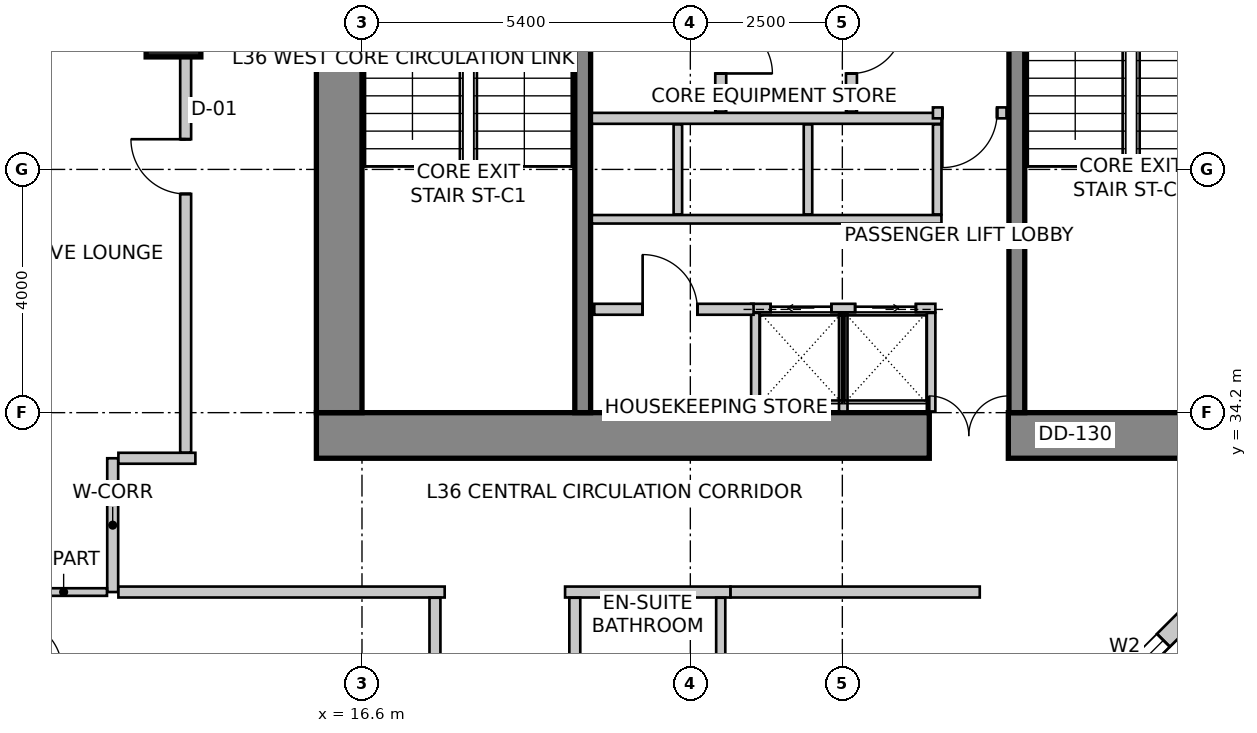
"""IFC4 building model, lengths in metres.
Left out: names, types, materials, properties, quantities, classifications, styles, units other than length and angle.
Written with IfcOpenShell. Run it as: python <this file> out.ifc"""

import sys

from ifc_helpers import new_model, si_unit, direction, frame, frame_2d, origin, origin_2d, place, context, subcontext, project, spatial, rectangle, extrude, source, transform, mapped, element, fill, save


model = new_model("IFC4")
c1 = context("Model", 3, precision=1e-05, world=origin(), true_north=direction((0.0, 1.0)))
c2 = subcontext(c1, "Body", "Model", "MODEL_VIEW")
j1 = project(units=[si_unit("LENGTHUNIT", "METRE"), si_unit("PLANEANGLEUNIT", "RADIAN")], contexts=[c1])
p1 = place(None, origin())
s1 = spatial("IfcSite", under=j1, at=p1, CompositionType="ELEMENT")
p2 = place(p1, origin())
s2 = spatial("IfcBuilding", under=s1, at=p2, CompositionType="ELEMENT")
p3 = place(p2, frame((0.0, 0.0, 146.6)))
s3 = spatial("IfcBuildingStorey", under=s2, at=p3, CompositionType="ELEMENT", Elevation=146.6)
p4 = place(p3, frame((15.85, 33.825, 0.0), z_axis=(0.0, 0.0, 1.0), x_axis=(1.0, 0.0, 0.0)))
e1 = element("IfcWall", 1, at=p4, inside=s3, PredefinedType="SHEAR", context=c2, shape_type="SweptSolid", body=[
    extrude(rectangle(XDim=15.9, YDim=0.75, at=frame_2d((7.95, 0.0))), origin(), (0.0, 0.0, 1.0), 3.6),
])
m1 = source(origin(), c2, "Body", "SweptSolid", [
    extrude(rectangle(XDim=1.3, YDim=2.15, at=frame_2d((0.65, 1.075))), frame((0.0, 0.385, 0.0), z_axis=(0.0, -1.0, 0.0), x_axis=(1.0, 0.0, 0.0)), (0.0, 0.0, 1.0), 0.77),
])
p5 = place(p4, frame((10.08, 0.0, 0.0)))
e2 = element("IfcOpeningElement", 2, at=p5, cuts=e1, PredefinedType="OPENING", context=c2, shape_type="MappedRepresentation", body=[
    mapped(m1, transform((0.0, 0.0, 0.0), scale=1.0)),
])
p6 = place(p3, frame((16.225, 34.2, 0.0), z_axis=(0.0, 0.0, 1.0), x_axis=(0.0, 1.0, 0.0)))
e3 = element("IfcWall", 3, at=p6, inside=s3, PredefinedType="SHEAR", context=c2, shape_type="SweptSolid", body=[
    extrude(rectangle(XDim=11.4, YDim=0.75, at=frame_2d((5.7, 0.0))), origin(), (0.0, 0.0, 1.0), 3.6),
])
m2 = source(origin(), c2, "Body", "SweptSolid", [
    extrude(rectangle(XDim=1.1, YDim=2.15, at=frame_2d((0.55, 1.075))), frame((0.0, 0.385, 0.0), z_axis=(0.0, -1.0, 0.0), x_axis=(1.0, 0.0, 0.0)), (0.0, 0.0, 1.0), 0.77),
])
p7 = place(p6, frame((7.15, 0.0, 0.0)))
e4 = element("IfcOpeningElement", 4, at=p7, cuts=e3, PredefinedType="OPENING", context=c2, shape_type="MappedRepresentation", body=[
    mapped(m2, transform((0.0, 0.0, 0.0), scale=1.0)),
])
p8 = place(p3, frame((20.23, 34.2, 0.0), z_axis=(0.0, 0.0, 1.0), x_axis=(0.0, 1.0, 0.0)))
e5 = element("IfcWall", 5, at=p8, inside=s3, PredefinedType="SHEAR", context=c2, shape_type="SweptSolid", body=[
    extrude(rectangle(XDim=9.06, YDim=0.26, at=frame_2d((4.53, 0.0))), origin(), (0.0, 0.0, 1.0), 3.6),
])
m3 = source(origin(), c2, "Body", "SweptSolid", [
    extrude(rectangle(XDim=1.1, YDim=2.15, at=frame_2d((0.55, 1.075))), frame((0.0, 0.14, 0.0), z_axis=(0.0, -1.0, 0.0), x_axis=(1.0, 0.0, 0.0)), (0.0, 0.0, 1.0), 0.28),
])
p9 = place(p8, frame((7.45, 0.0, 0.0)))
e6 = element("IfcOpeningElement", 6, at=p9, cuts=e5, PredefinedType="OPENING", context=c2, shape_type="MappedRepresentation", body=[
    mapped(m3, transform((0.0, 0.0, 0.0), scale=1.0)),
])
p10 = place(p3, frame((27.37, 34.2, 0.0), z_axis=(0.0, 0.0, 1.0), x_axis=(0.0, 1.0, 0.0)))
e7 = element("IfcWall", 7, at=p10, inside=s3, PredefinedType="SHEAR", context=c2, shape_type="SweptSolid", body=[
    extrude(rectangle(XDim=9.06, YDim=0.26, at=frame_2d((4.53, 0.0))), origin(), (0.0, 0.0, 1.0), 3.6),
])
p11 = place(p10, frame((7.45, 0.0, 0.0)))
e8 = element("IfcOpeningElement", 8, at=p11, cuts=e7, PredefinedType="OPENING", context=c2, shape_type="MappedRepresentation", body=[
    mapped(m3, transform((0.0, 0.0, 0.0), scale=1.0)),
])
m4 = source(origin(), c2, "Body", "SweptSolid", [
    extrude(rectangle(XDim=0.9, YDim=0.9, at=origin_2d()), origin(), (0.0, 0.0, 1.0), 3.6),
])
p12 = place(p3, frame((13.5, 40.5, 0.0), z_axis=(0.0, 0.0, 1.0), x_axis=(1.0, 0.0, 0.0)))
e9 = element("IfcColumn", 9, at=p12, inside=s3, PredefinedType="COLUMN", context=c2, shape_type="MappedRepresentation", body=[
    mapped(m4, transform((0.0, 0.0, 0.0), scale=1.0)),
])
p13 = place(p3, frame((28.116, 28.792, 0.0), z_axis=(0.0, 0.0, 1.0), x_axis=(0.707064797706, 0.707148762175, 0.0)))
e10 = element("IfcWall", 10, at=p13, inside=s3, PredefinedType="SOLIDWALL", context=c2, shape_type="SweptSolid", body=[
    extrude(rectangle(XDim=2.908, YDim=0.3, at=frame_2d((1.454, 0.0))), origin(), (0.0, 0.0, 1.0), 3.35),
])
m5 = source(origin(), c2, "Body", "SweptSolid", [
    extrude(rectangle(XDim=1.8, YDim=2.1, at=frame_2d((0.9, 1.05))), frame((0.0, 0.16, 0.0), z_axis=(0.0, -1.0, 0.0), x_axis=(1.0, 0.0, 0.0)), (0.0, 0.0, 1.0), 0.32),
])
p14 = place(p13, frame((0.554, 0.0, 0.85)))
e11 = element("IfcOpeningElement", 11, at=p14, cuts=e10, PredefinedType="OPENING", context=c2, shape_type="MappedRepresentation", body=[
    mapped(m5, transform((0.0, 0.0, 0.0), scale=1.0)),
])
p15 = place(p3, frame((13.269, 47.134, 0.0), z_axis=(0.0, 0.0, 1.0), x_axis=(-0.319929773322, -0.947441259468, 0.0)))
e12 = element("IfcWall", 12, at=p15, inside=s3, PredefinedType="SOLIDWALL", context=c2, shape_type="SweptSolid", body=[
    extrude(rectangle(XDim=16.134, YDim=0.3, at=frame_2d((8.067, 0.0))), origin(), (0.0, 0.0, 1.0), 3.35),
])
m6 = source(origin(), c2, "Body", "SweptSolid", [
    extrude(rectangle(XDim=2.4, YDim=2.2, at=frame_2d((1.2, 1.1))), frame((0.0, 0.16, 0.0), z_axis=(0.0, -1.0, 0.0), x_axis=(1.0, 0.0, 0.0)), (0.0, 0.0, 1.0), 0.32),
])
p16 = place(p15, frame((2.276, 0.0, 0.85)))
e13 = element("IfcOpeningElement", 13, at=p16, cuts=e12, PredefinedType="OPENING", context=c2, shape_type="MappedRepresentation", body=[
    mapped(m6, transform((0.0, 0.0, 0.0), scale=1.0)),
])
m7 = source(origin(), c2, "Body", "SweptSolid", [
    extrude(rectangle(XDim=2.1, YDim=2.0, at=frame_2d((1.05, 1.0))), frame((0.0, 0.16, 0.0), z_axis=(0.0, -1.0, 0.0), x_axis=(1.0, 0.0, 0.0)), (0.0, 0.0, 1.0), 0.32),
])
p17 = place(p15, frame((7.361, 0.0, 0.85)))
e14 = element("IfcOpeningElement", 14, at=p17, cuts=e12, PredefinedType="OPENING", context=c2, shape_type="MappedRepresentation", body=[
    mapped(m7, transform((0.0, 0.0, 0.0), scale=1.0)),
])
p18 = place(p15, frame((12.146, 0.0, 0.85)))
e15 = element("IfcOpeningElement", 15, at=p18, cuts=e12, PredefinedType="OPENING", context=c2, shape_type="MappedRepresentation", body=[
    mapped(m6, transform((0.0, 0.0, 0.0), scale=1.0)),
])
p19 = place(p3, frame((8.187, 31.834, 0.0), z_axis=(0.0, 0.0, 1.0), x_axis=(0.198869838988, -0.980025911464, 0.0)))
e16 = element("IfcWall", 16, at=p19, inside=s3, PredefinedType="SOLIDWALL", context=c2, shape_type="SweptSolid", body=[
    extrude(rectangle(XDim=16.363, YDim=0.3, at=frame_2d((8.182, 0.0))), origin(), (0.0, 0.0, 1.0), 3.35),
])
m8 = source(origin(), c2, "Body", "SweptSolid", [
    extrude(rectangle(XDim=1.2, YDim=1.6, at=frame_2d((0.6, 0.8))), frame((0.0, 0.16, 0.0), z_axis=(0.0, -1.0, 0.0), x_axis=(1.0, 0.0, 0.0)), (0.0, 0.0, 1.0), 0.32),
])
p20 = place(p19, frame((1.131, 0.0, 0.85)))
e17 = element("IfcOpeningElement", 17, at=p20, cuts=e16, PredefinedType="OPENING", context=c2, shape_type="MappedRepresentation", body=[
    mapped(m8, transform((0.0, 0.0, 0.0), scale=1.0)),
])
p21 = place(p19, frame((4.345, 0.0, 0.85)))
e18 = element("IfcOpeningElement", 18, at=p21, cuts=e16, PredefinedType="OPENING", context=c2, shape_type="MappedRepresentation", body=[
    mapped(m7, transform((0.0, 0.0, 0.0), scale=1.0)),
])
p22 = place(p19, frame((8.857, 0.0, 0.85)))
e19 = element("IfcOpeningElement", 19, at=p22, cuts=e16, PredefinedType="OPENING", context=c2, shape_type="MappedRepresentation", body=[
    mapped(m6, transform((0.0, 0.0, 0.0), scale=1.0)),
])
p23 = place(p19, frame((13.386, 0.0, 0.85)))
e20 = element("IfcOpeningElement", 20, at=p23, cuts=e16, PredefinedType="OPENING", context=c2, shape_type="MappedRepresentation", body=[
    mapped(m7, transform((0.0, 0.0, 0.0), scale=1.0)),
])
p24 = place(p3, frame((23.0, 35.92, 0.0), z_axis=(0.0, 0.0, 1.0), x_axis=(1.0, 0.0, 0.0)))
e21 = element("IfcWall", 21, at=p24, inside=s3, PredefinedType="SOLIDWALL", context=c2, shape_type="SweptSolid", body=[
    extrude(rectangle(XDim=3.03, YDim=0.14, at=frame_2d((1.515, 0.0))), origin(), (0.0, 0.0, 1.0), 3.35),
])
m9 = source(origin(), c2, "Body", "SweptSolid", [
    extrude(rectangle(XDim=1.0, YDim=2.15, at=frame_2d((0.5, 1.075))), frame((0.0, 0.08, 0.0), z_axis=(0.0, -1.0, 0.0), x_axis=(1.0, 0.0, 0.0)), (0.0, 0.0, 1.0), 0.16),
])
p25 = place(p24, frame((0.32, 0.0, 0.0)))
e22 = element("IfcOpeningElement", 22, at=p25, cuts=e21, PredefinedType="OPENING", context=c2, shape_type="MappedRepresentation", body=[
    mapped(m9, transform((0.0, 0.0, 0.0), scale=1.0)),
])
p26 = place(p24, frame((1.71, 0.0, 0.0)))
e23 = element("IfcOpeningElement", 23, at=p26, cuts=e21, PredefinedType="OPENING", context=c2, shape_type="MappedRepresentation", body=[
    mapped(m9, transform((0.0, 0.0, 0.0), scale=1.0)),
])
for number, where, z_axis, x_axis in (
    (24, (25.96, 34.22, 0.0), (0.0, 0.0, 1.0), (0.0, 1.0, 0.0)),
    (25, (23.07, 34.22, 0.0), (0.0, 0.0, 1.0), (0.0, 1.0, 0.0)),
    (26, (24.515, 34.22, 0.0), (0.0, 0.0, 1.0), (0.0, 1.0, 0.0)),
):
    element("IfcWall", number, at=place(p3, frame(where, z_axis=z_axis, x_axis=x_axis)), inside=s3, PredefinedType="SOLIDWALL", context=c2, shape_type="SweptSolid", body=[
        extrude(rectangle(XDim=1.62, YDim=0.14, at=frame_2d((0.81, 0.0))), origin(), (0.0, 0.0, 1.0), 2.642),
    ])
p27 = place(p3, frame((20.38, 37.38, 0.0), z_axis=(0.0, 0.0, 1.0), x_axis=(1.0, 0.0, 0.0)))
e27 = element("IfcWall", 27, at=p27, inside=s3, PredefinedType="SOLIDWALL", context=c2, shape_type="SweptSolid", body=[
    extrude(rectangle(XDim=5.75, YDim=0.14, at=frame_2d((2.875, 0.0))), origin(), (0.0, 0.0, 1.0), 3.35),
])
p28 = place(p3, frame((20.38, 39.04, 0.0), z_axis=(0.0, 0.0, 1.0), x_axis=(1.0, 0.0, 0.0)))
e28 = element("IfcWall", 28, at=p28, inside=s3, PredefinedType="SOLIDWALL", context=c2, shape_type="SweptSolid", body=[
    extrude(rectangle(XDim=5.75, YDim=0.18, at=frame_2d((2.875, 0.0))), origin(), (0.0, 0.0, 1.0), 3.35),
])
for number, where, z_axis, x_axis in (
    (29, (26.06, 37.46, 0.0), (0.0, 0.0, 1.0), (0.0, 1.0, 0.0)),
    (30, (21.795, 37.46, 0.0), (0.0, 0.0, 1.0), (0.0, 1.0, 0.0)),
    (31, (23.935, 37.46, 0.0), (0.0, 0.0, 1.0), (0.0, 1.0, 0.0)),
):
    element("IfcWall", number, at=place(p3, frame(where, z_axis=z_axis, x_axis=x_axis)), inside=s3, PredefinedType="SOLIDWALL", context=c2, shape_type="SweptSolid", body=[
        extrude(rectangle(XDim=1.48, YDim=0.14, at=frame_2d((0.74, 0.0))), origin(), (0.0, 0.0, 1.0), 3.35),
    ])
p29 = place(p3, frame((22.5, 41.256, 0.0), z_axis=(0.0, 0.0, 1.0), x_axis=(0.0, -1.0, 0.0)))
e32 = element("IfcWall", 32, at=p29, inside=s3, PredefinedType="PARTITIONING", context=c2, shape_type="SweptSolid", body=[
    extrude(rectangle(XDim=2.106, YDim=0.18, at=frame_2d((1.053, 0.0))), origin(), (0.0, 0.0, 1.0), 3.35),
])
m10 = source(origin(), c2, "Body", "SweptSolid", [
    extrude(rectangle(XDim=0.85, YDim=2.15, at=frame_2d((0.425, 1.075))), frame((0.0, 0.1, 0.0), z_axis=(0.0, -1.0, 0.0), x_axis=(1.0, 0.0, 0.0)), (0.0, 0.0, 1.0), 0.2),
])
p30 = place(p29, frame((0.628, 0.0, 0.0)))
e33 = element("IfcOpeningElement", 33, at=p30, cuts=e32, PredefinedType="OPENING", context=c2, shape_type="MappedRepresentation", body=[
    mapped(m10, transform((0.0, 0.0, 0.0), scale=1.0)),
])
p31 = place(p3, frame((24.65, 41.256, 0.0), z_axis=(0.0, 0.0, 1.0), x_axis=(0.0, -1.0, 0.0)))
e34 = element("IfcWall", 34, at=p31, inside=s3, PredefinedType="PARTITIONING", context=c2, shape_type="SweptSolid", body=[
    extrude(rectangle(XDim=2.106, YDim=0.18, at=frame_2d((1.053, 0.0))), origin(), (0.0, 0.0, 1.0), 3.35),
])
p32 = place(p31, frame((0.628, 0.0, 0.0)))
e35 = element("IfcOpeningElement", 35, at=p32, cuts=e34, PredefinedType="OPENING", context=c2, shape_type="MappedRepresentation", body=[
    mapped(m10, transform((0.0, 0.0, 0.0), scale=1.0)),
])
p33 = place(p3, frame((27.2, 39.13, 0.0), z_axis=(0.0, 0.0, 1.0), x_axis=(-1.0, 0.0, 0.0)))
e36 = element("IfcWall", 36, at=p33, inside=s3, PredefinedType="PARTITIONING", context=c2, shape_type="SweptSolid", body=[
    extrude(rectangle(XDim=1.21, YDim=0.18, at=frame_2d((0.605, 0.0))), origin(), (0.0, 0.0, 1.0), 3.35),
])
m11 = source(origin(), c2, "Body", "SweptSolid", [
    extrude(rectangle(XDim=0.9, YDim=2.15, at=frame_2d((0.45, 1.075))), frame((0.0, 0.1, 0.0), z_axis=(0.0, -1.0, 0.0), x_axis=(1.0, 0.0, 0.0)), (0.0, 0.0, 1.0), 0.2),
])
p34 = place(p33, frame((0.155, 0.0, 0.0)))
e37 = element("IfcOpeningElement", 37, at=p34, cuts=e36, PredefinedType="OPENING", context=c2, shape_type="MappedRepresentation", body=[
    mapped(m11, transform((0.0, 0.0, 0.0), scale=1.0)),
])
p35 = place(p3, frame((20.42, 35.9, 0.0), z_axis=(0.0, 0.0, 1.0), x_axis=(1.0, 0.0, 0.0)))
e38 = element("IfcWall", 38, at=p35, inside=s3, PredefinedType="PARTITIONING", context=c2, shape_type="SweptSolid", body=[
    extrude(rectangle(XDim=2.62, YDim=0.18, at=frame_2d((1.31, 0.0))), origin(), (0.0, 0.0, 1.0), 3.35),
])
p36 = place(p35, frame((0.796, 0.0, 0.0)))
e39 = element("IfcOpeningElement", 39, at=p36, cuts=e38, PredefinedType="OPENING", context=c2, shape_type="MappedRepresentation", body=[
    mapped(m11, transform((0.0, 0.0, 0.0), scale=1.0)),
])
p37 = place(p3, frame((12.5, 31.25, 0.0), z_axis=(0.0, 0.0, 1.0), x_axis=(0.0, 1.0, 0.0)))
e40 = element("IfcWall", 40, at=p37, inside=s3, PredefinedType="PARTITIONING", context=c2, shape_type="SweptSolid", body=[
    extrude(rectangle(XDim=2.2, YDim=0.18, at=frame_2d((1.1, 0.0))), origin(), (0.0, 0.0, 1.0), 2.935),
])
p38 = place(p3, frame((12.594, 33.45, 0.0), z_axis=(0.0, 0.0, 1.0), x_axis=(1.0, 0.0, 0.0)))
e41 = element("IfcWall", 41, at=p38, inside=s3, PredefinedType="PARTITIONING", context=c2, shape_type="SweptSolid", body=[
    extrude(rectangle(XDim=1.266, YDim=0.18, at=frame_2d((0.633, 0.0))), origin(), (0.0, 0.0, 1.0), 3.35),
])
p39 = place(p3, frame((17.96, 31.25, 0.0), z_axis=(0.0, 0.0, 1.0), x_axis=(-1.0, 0.0, 0.0)))
e42 = element("IfcWall", 42, at=p39, inside=s3, PredefinedType="PARTITIONING", context=c2, shape_type="SweptSolid", body=[
    extrude(rectangle(XDim=5.366, YDim=0.18, at=frame_2d((2.683, 0.0))), origin(), (0.0, 0.0, 1.0), 2.935),
])
p40 = place(p3, frame((22.66, 31.25, 0.0), z_axis=(0.0, 0.0, 1.0), x_axis=(-1.0, 0.0, 0.0)))
e43 = element("IfcWall", 43, at=p40, inside=s3, PredefinedType="PARTITIONING", context=c2, shape_type="SweptSolid", body=[
    extrude(rectangle(XDim=2.72, YDim=0.18, at=frame_2d((1.36, 0.0))), origin(), (0.0, 0.0, 1.0), 2.935),
])
p41 = place(p3, frame((26.76, 31.25, 0.0), z_axis=(0.0, 0.0, 1.0), x_axis=(-1.0, 0.0, 0.0)))
e44 = element("IfcWall", 44, at=p41, inside=s3, PredefinedType="PARTITIONING", context=c2, shape_type="SweptSolid", body=[
    extrude(rectangle(XDim=4.098, YDim=0.18, at=frame_2d((2.049, 0.0))), origin(), (0.0, 0.0, 1.0), 3.35),
])
p42 = place(p3, frame((13.7, 33.544, 0.0), z_axis=(0.0, 0.0, 1.0), x_axis=(0.0, 1.0, 0.0)))
e45 = element("IfcWall", 45, at=p42, inside=s3, PredefinedType="PARTITIONING", context=c2, shape_type="SweptSolid", body=[
    extrude(rectangle(XDim=13.86, YDim=0.18, at=frame_2d((6.93, 0.0))), origin(), (0.0, 0.0, 1.0), 2.492),
])
p43 = place(p42, frame((4.253, 0.0, 0.0)))
e46 = element("IfcOpeningElement", 46, at=p43, cuts=e45, PredefinedType="OPENING", context=c2, shape_type="MappedRepresentation", body=[
    mapped(m11, transform((0.0, 0.0, 0.0), scale=1.0)),
])
p44 = place(p3, frame((12.406, 31.25, 0.0), z_axis=(0.0, 0.0, 1.0), x_axis=(-1.0, 0.0, 0.0)))
e47 = element("IfcWall", 47, at=p44, inside=s3, PredefinedType="PARTITIONING", context=c2, shape_type="SweptSolid", body=[
    extrude(rectangle(XDim=1.426, YDim=0.125, at=frame_2d((0.713, 0.0))), origin(), (0.0, 0.0, 1.0), 2.492),
])
p45 = place(p3, frame((17.8, 19.5, 0.0), z_axis=(0.0, 0.0, 1.0), x_axis=(0.0, 1.0, 0.0)))
e48 = element("IfcWall", 48, at=p45, inside=s3, PredefinedType="PARTITIONING", context=c2, shape_type="SweptSolid", body=[
    extrude(rectangle(XDim=11.656, YDim=0.18, at=frame_2d((5.828, 0.0))), origin(), (0.0, 0.0, 1.0), 2.788),
])
p46 = place(p45, frame((5.378, 0.0, 0.0)))
e49 = element("IfcOpeningElement", 49, at=p46, cuts=e48, PredefinedType="OPENING", context=c2, shape_type="MappedRepresentation", body=[
    mapped(m11, transform((0.0, 0.0, 0.0), scale=1.0)),
])
p47 = place(p3, frame((20.1, 31.156, 0.0), z_axis=(0.0, 0.0, 1.0), x_axis=(0.0, -1.0, 0.0)))
e50 = element("IfcWall", 50, at=p47, inside=s3, PredefinedType="PARTITIONING", context=c2, shape_type="SweptSolid", body=[
    extrude(rectangle(XDim=2.266, YDim=0.18, at=frame_2d((1.133, 0.0))), origin(), (0.0, 0.0, 1.0), 2.935),
])
p48 = place(p3, frame((22.5, 31.156, 0.0), z_axis=(0.0, 0.0, 1.0), x_axis=(0.0, -1.0, 0.0)))
e51 = element("IfcWall", 51, at=p48, inside=s3, PredefinedType="PARTITIONING", context=c2, shape_type="SweptSolid", body=[
    extrude(rectangle(XDim=2.027, YDim=0.15, at=frame_2d((1.014, 0.0))), origin(), (0.0, 0.0, 1.0), 2.935),
])
m12 = source(origin(), c2, "Body", "SweptSolid", [
    extrude(rectangle(XDim=1.8, YDim=2.1, at=frame_2d((0.9, 1.05))), frame((0.0, -0.015, 0.0), z_axis=(0.0, -1.0, 0.0), x_axis=(1.0, 0.0, 0.0)), (0.0, 0.0, 1.0), 0.06),
])
p49 = place(p14, origin())
e52 = element("IfcWindow", 52, at=p49, inside=s3, PartitioningType="SINGLE_PANEL", PredefinedType="WINDOW", context=c2, shape_type="MappedRepresentation", body=[
    mapped(m12, transform((0.0, 0.0, 0.0), scale=1.0)),
])
fill(e11, e52)
m13 = source(origin(), c2, "Body", "SweptSolid", [
    extrude(rectangle(XDim=1.0, YDim=2.15, at=frame_2d((0.5, 1.075))), frame((0.0, 0.025, 0.0), z_axis=(0.0, -1.0, 0.0), x_axis=(1.0, 0.0, 0.0)), (0.0, 0.0, 1.0), 0.05),
])
p50 = place(p25, origin())
e53 = element("IfcDoor", 53, at=p50, inside=s3, OperationType="SLIDING_TO_LEFT", PredefinedType="DOOR", context=c2, shape_type="MappedRepresentation", body=[
    mapped(m13, transform((0.0, 0.0, 0.0), scale=1.0)),
])
fill(e22, e53)
p51 = place(p26, origin())
e54 = element("IfcDoor", 54, at=p51, inside=s3, OperationType="SLIDING_TO_RIGHT", PredefinedType="DOOR", context=c2, shape_type="MappedRepresentation", body=[
    mapped(m13, transform((0.0, 0.0, 0.0), scale=1.0)),
])
fill(e23, e54)
m14 = source(origin(), c2, "Body", "SweptSolid", [
    extrude(rectangle(XDim=1.3, YDim=2.15, at=frame_2d((0.65, 1.075))), frame((0.0, 0.025, 0.0), z_axis=(0.0, -1.0, 0.0), x_axis=(1.0, 0.0, 0.0)), (0.0, 0.0, 1.0), 0.05),
])
p52 = place(p5, origin())
e55 = element("IfcDoor", 55, at=p52, inside=s3, OperationType="DOUBLE_DOOR_SINGLE_SWING", PredefinedType="DOOR", context=c2, shape_type="MappedRepresentation", body=[
    mapped(m14, transform((0.0, 0.0, 0.0), scale=1.0)),
])
fill(e2, e55)
m15 = source(origin(), c2, "Body", "SweptSolid", [
    extrude(rectangle(XDim=0.85, YDim=2.15, at=frame_2d((0.425, 1.075))), frame((0.0, 0.025, 0.0), z_axis=(0.0, -1.0, 0.0), x_axis=(1.0, 0.0, 0.0)), (0.0, 0.0, 1.0), 0.05),
])
p53 = place(p30, origin())
e56 = element("IfcDoor", 56, at=p53, inside=s3, OperationType="SINGLE_SWING_RIGHT", PredefinedType="DOOR", context=c2, shape_type="MappedRepresentation", body=[
    mapped(m15, transform((0.0, 0.0, 0.0), scale=1.0)),
])
fill(e33, e56)
p54 = place(p32, origin())
e57 = element("IfcDoor", 57, at=p54, inside=s3, OperationType="SINGLE_SWING_LEFT", PredefinedType="DOOR", context=c2, shape_type="MappedRepresentation", body=[
    mapped(m15, transform((0.0, 0.0, 0.0), scale=1.0)),
])
fill(e35, e57)
m16 = source(origin(), c2, "Body", "SweptSolid", [
    extrude(rectangle(XDim=0.9, YDim=2.15, at=frame_2d((0.45, 1.075))), frame((0.0, 0.025, 0.0), z_axis=(0.0, -1.0, 0.0), x_axis=(1.0, 0.0, 0.0)), (0.0, 0.0, 1.0), 0.05),
])
p55 = place(p34, origin())
e58 = element("IfcDoor", 58, at=p55, inside=s3, OperationType="SINGLE_SWING_RIGHT", PredefinedType="DOOR", context=c2, shape_type="MappedRepresentation", body=[
    mapped(m16, transform((0.0, 0.0, 0.0), scale=1.0)),
])
fill(e37, e58)
p56 = place(p36, origin())
e59 = element("IfcDoor", 59, at=p56, inside=s3, OperationType="SINGLE_SWING_LEFT", PredefinedType="DOOR", context=c2, shape_type="MappedRepresentation", body=[
    mapped(m16, transform((0.0, 0.0, 0.0), scale=1.0)),
])
fill(e39, e59)
m17 = source(origin(), c2, "Body", "SweptSolid", [
    extrude(rectangle(XDim=0.9, YDim=2.15, at=frame_2d((0.45, 1.075))), frame((0.0, 0.025, 0.0), z_axis=(0.0, -1.0, 0.0), x_axis=(1.0, 0.0, 0.0)), (0.0, 0.0, 1.0), 0.05),
])
p57 = place(p43, origin())
e60 = element("IfcDoor", 60, at=p57, inside=s3, OperationType="SINGLE_SWING_RIGHT", PredefinedType="DOOR", context=c2, shape_type="MappedRepresentation", body=[
    mapped(m17, transform((0.0, 0.0, 0.0), scale=1.0)),
])
fill(e46, e60)
save(model, sys.argv[1])
